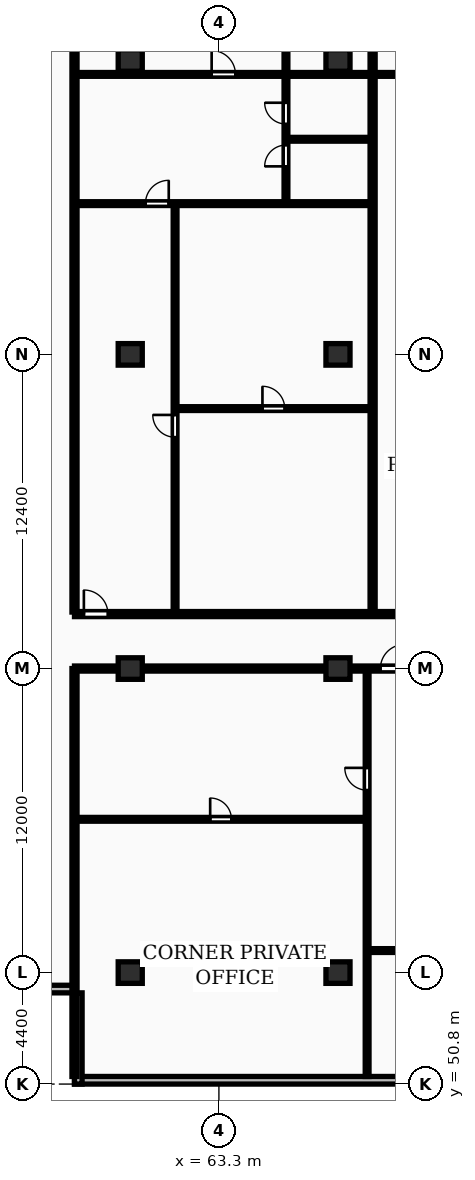
"""IFC4 building model, lengths in metres.
Left out: names, types, materials, properties, quantities, classifications, styles, units other than length and angle.
Written with IfcOpenShell. Run it as: python <this file> out.ifc"""

import sys

from ifc_helpers import new_model, si_unit, direction, frame, frame_2d, origin, origin_2d, place, context, subcontext, project, spatial, rectangle, extrude, element, fill, save


model = new_model("IFC4")
c1 = context("Model", 3, precision=1e-05, world=origin(), true_north=direction((0.0, 1.0)))
c2 = subcontext(c1, "Body", "Model", "MODEL_VIEW")
j1 = project(units=[si_unit("LENGTHUNIT", "METRE"), si_unit("PLANEANGLEUNIT", "RADIAN")], contexts=[c1])
p1 = place(None, origin())
s1 = spatial("IfcSite", under=j1, at=p1, CompositionType="ELEMENT")
p2 = place(p1, origin())
s2 = spatial("IfcBuilding", under=s1, at=p2, CompositionType="ELEMENT")
p3 = place(p2, frame((0.0, 0.0, 87.3)))
s3 = spatial("IfcBuildingStorey", under=s2, at=p3, CompositionType="ELEMENT", Elevation=87.3)
for number, where, z_axis, x_axis in (
    (1, (59.8, 55.2, 0.0), (0.0, 0.0, 1.0), (1.0, 0.0, 0.0)),
    (2, (59.8, 67.2, 0.0), (0.0, 0.0, 1.0), (1.0, 0.0, 0.0)),
    (3, (59.8, 79.6, 0.0), (0.0, 0.0, 1.0), (1.0, 0.0, 0.0)),
    (4, (59.8, 91.2, 0.0), (0.0, 0.0, 1.0), (1.0, 0.0, 0.0)),
    (5, (68.0, 55.2, 0.0), (0.0, 0.0, 1.0), (1.0, 0.0, 0.0)),
    (6, (68.0, 67.2, 0.0), (0.0, 0.0, 1.0), (1.0, 0.0, 0.0)),
    (7, (68.0, 79.6, 0.0), (0.0, 0.0, 1.0), (1.0, 0.0, 0.0)),
    (8, (68.0, 91.2, 0.0), (0.0, 0.0, 1.0), (1.0, 0.0, 0.0)),
):
    element("IfcColumn", number, at=place(p3, frame(where, z_axis=z_axis, x_axis=x_axis)), inside=s3, PredefinedType="COLUMN", context=c2, shape_type="SweptSolid", body=[
        extrude(rectangle(XDim=0.95, YDim=0.85, at=origin_2d()), origin(), (0.0, 0.0, 1.0), 3.25),
    ])
p4 = place(p3, frame((57.6, 50.95, 0.0), z_axis=(0.0, 0.0, 1.0), x_axis=(1.0, 0.0, 0.0)))
e9 = element("IfcWall", 9, at=p4, inside=s3, PredefinedType="STANDARD", context=c2, shape_type="SweptSolid", body=[
    extrude(rectangle(XDim=73.0, YDim=0.3, at=frame_2d((36.5, 0.0))), origin(), (0.0, 0.0, 1.0), 2.97),
])
p5 = place(p4, frame((15.225, 0.0, 0.85)))
e10 = element("IfcOpeningElement", 10, at=p5, cuts=e9, PredefinedType="OPENING", context=c2, shape_type="SweptSolid", body=[
    extrude(rectangle(XDim=1.8, YDim=1.8, at=frame_2d((0.9, 0.9))), frame((0.0, 0.16, 0.0), z_axis=(0.0, -1.0, 0.0), x_axis=(1.0, 0.0, 0.0)), (0.0, 0.0, 1.0), 0.32),
])
p6 = place(p4, frame((58.575, 0.0, 0.85)))
e11 = element("IfcOpeningElement", 11, at=p6, cuts=e9, PredefinedType="OPENING", context=c2, shape_type="SweptSolid", body=[
    extrude(rectangle(XDim=1.8, YDim=1.8, at=frame_2d((0.9, 0.9))), frame((0.0, 0.16, 0.0), z_axis=(0.0, -1.0, 0.0), x_axis=(1.0, 0.0, 0.0)), (0.0, 0.0, 1.0), 0.32),
])
p7 = place(p3, frame((54.0, 54.55, 0.0), z_axis=(0.0, 0.0, 1.0), x_axis=(1.0, 0.0, 0.0)))
e12 = element("IfcWall", 12, at=p7, inside=s3, PredefinedType="STANDARD", context=c2, shape_type="SweptSolid", body=[
    extrude(rectangle(XDim=3.6, YDim=0.3, at=frame_2d((1.8, 0.0))), origin(), (0.0, 0.0, 1.0), 2.97),
])
p8 = place(p3, frame((57.75, 54.4, 0.0), z_axis=(0.0, 0.0, 1.0), x_axis=(0.0, -1.0, 0.0)))
e13 = element("IfcWall", 13, at=p8, inside=s3, PredefinedType="STANDARD", context=c2, shape_type="SweptSolid", body=[
    extrude(rectangle(XDim=3.6, YDim=0.3, at=frame_2d((1.8, 0.0))), origin(), (0.0, 0.0, 1.0), 2.97),
])
p9 = place(p3, frame((57.6, 51.1, 0.0), z_axis=(0.0, 0.0, 1.0), x_axis=(0.0, 1.0, 0.0)))
e14 = element("IfcWall", 14, at=p9, inside=s3, PredefinedType="PARTITIONING", context=c2, shape_type="SweptSolid", body=[
    extrude(rectangle(XDim=16.1, YDim=0.2, at=frame_2d((8.05, 0.0))), origin(), (0.0, 0.0, 1.0), 2.97),
])
p10 = place(p3, frame((57.6, 61.25, 0.0), z_axis=(0.0, 0.0, 1.0), x_axis=(1.0, 0.0, 0.0)))
e15 = element("IfcWall", 15, at=p10, inside=s3, PredefinedType="PARTITIONING", context=c2, shape_type="SweptSolid", body=[
    extrude(rectangle(XDim=11.55, YDim=0.15, at=frame_2d((5.775, 0.0))), origin(), (0.0, 0.0, 1.0), 2.97),
])
p11 = place(p10, frame((5.355, 0.0, 0.0)))
e16 = element("IfcOpeningElement", 16, at=p11, cuts=e15, PredefinedType="OPENING", context=c2, shape_type="SweptSolid", body=[
    extrude(rectangle(XDim=0.84, YDim=2.04, at=frame_2d((0.42, 1.02))), frame((0.0, 0.085, 0.0), z_axis=(0.0, -1.0, 0.0), x_axis=(1.0, 0.0, 0.0)), (0.0, 0.0, 1.0), 0.17),
])
p12 = place(p3, frame((69.15, 51.1, 0.0), z_axis=(0.0, 0.0, 1.0), x_axis=(0.0, 1.0, 0.0)))
e17 = element("IfcWall", 17, at=p12, inside=s3, PredefinedType="PARTITIONING", context=c2, shape_type="SweptSolid", body=[
    extrude(rectangle(XDim=16.05, YDim=0.15, at=frame_2d((8.025, 0.0))), origin(), (0.0, 0.0, 1.0), 2.97),
])
p13 = place(p12, frame((11.3, 0.0, 0.0)))
e18 = element("IfcOpeningElement", 18, at=p13, cuts=e17, PredefinedType="OPENING", context=c2, shape_type="SweptSolid", body=[
    extrude(rectangle(XDim=0.88, YDim=2.06, at=frame_2d((0.44, 1.03))), frame((0.0, 0.085, 0.0), z_axis=(0.0, -1.0, 0.0), x_axis=(1.0, 0.0, 0.0)), (0.0, 0.0, 1.0), 0.17),
])
p14 = place(p3, frame((69.17, 56.07, 0.0), z_axis=(0.0, 0.0, 1.0), x_axis=(1.0, 0.0, 0.0)))
e19 = element("IfcWall", 19, at=p14, inside=s3, PredefinedType="PARTITIONING", context=c2, shape_type="SweptSolid", body=[
    extrude(rectangle(XDim=6.76, YDim=0.15, at=frame_2d((3.38, 0.0))), origin(), (0.0, 0.0, 1.0), 2.97),
])
p15 = place(p14, frame((1.362, 0.0, 0.0)))
e20 = element("IfcOpeningElement", 20, at=p15, cuts=e19, PredefinedType="OPENING", context=c2, shape_type="SweptSolid", body=[
    extrude(rectangle(XDim=0.84, YDim=2.04, at=frame_2d((0.42, 1.02))), frame((0.0, 0.085, 0.0), z_axis=(0.0, -1.0, 0.0), x_axis=(1.0, 0.0, 0.0)), (0.0, 0.0, 1.0), 0.17),
])
p16 = place(p14, frame((4.277, 0.0, 0.0)))
e21 = element("IfcOpeningElement", 21, at=p16, cuts=e19, PredefinedType="OPENING", context=c2, shape_type="SweptSolid", body=[
    extrude(rectangle(XDim=0.88, YDim=2.06, at=frame_2d((0.44, 1.03))), frame((0.0, 0.085, 0.0), z_axis=(0.0, -1.0, 0.0), x_axis=(1.0, 0.0, 0.0)), (0.0, 0.0, 1.0), 0.17),
])
p17 = place(p3, frame((57.6, 67.2, 0.0), z_axis=(0.0, 0.0, 1.0), x_axis=(1.0, 0.0, 0.0)))
e22 = element("IfcWall", 22, at=p17, inside=s3, PredefinedType="PARTITIONING", context=c2, shape_type="SweptSolid", body=[
    extrude(rectangle(XDim=18.35, YDim=0.2, at=frame_2d((9.175, 0.0))), origin(), (0.0, 0.0, 1.0), 2.433),
])
p18 = place(p17, frame((12.075, 0.0, 0.0)))
e23 = element("IfcOpeningElement", 23, at=p18, cuts=e22, PredefinedType="OPENING", context=c2, shape_type="SweptSolid", body=[
    extrude(rectangle(XDim=0.95, YDim=2.15, at=frame_2d((0.475, 1.075))), frame((0.0, 0.11, 0.0), z_axis=(0.0, -1.0, 0.0), x_axis=(1.0, 0.0, 0.0)), (0.0, 0.0, 1.0), 0.22),
])
for number, where, z_axis, x_axis in (
    (24, (57.6, 69.43, 0.0), (0.0, 0.0, 1.0), (0.0, 1.0, 0.0)),
    (25, (69.367, 69.43, 0.0), (0.0, 0.0, 1.0), (0.0, 1.0, 0.0)),
):
    element("IfcWall", number, at=place(p3, frame(where, z_axis=z_axis, x_axis=x_axis)), inside=s3, PredefinedType="PARTITIONING", context=c2, shape_type="SweptSolid", body=[
        extrude(rectangle(XDim=26.47, YDim=0.2, at=frame_2d((13.235, 0.0))), origin(), (0.0, 0.0, 1.0), 2.97),
    ])
p19 = place(p3, frame((61.63, 77.46, 0.0), z_axis=(0.0, 0.0, 1.0), x_axis=(1.0, 0.0, 0.0)))
e26 = element("IfcWall", 26, at=p19, inside=s3, PredefinedType="PARTITIONING", context=c2, shape_type="SweptSolid", body=[
    extrude(rectangle(XDim=7.657, YDim=0.15, at=frame_2d((3.828, 0.0))), origin(), (0.0, 0.0, 1.0), 2.97),
])
p20 = place(p19, frame((3.388, 0.0, 0.0)))
e27 = element("IfcOpeningElement", 27, at=p20, cuts=e26, PredefinedType="OPENING", context=c2, shape_type="SweptSolid", body=[
    extrude(rectangle(XDim=0.88, YDim=2.06, at=frame_2d((0.44, 1.03))), frame((0.0, 0.085, 0.0), z_axis=(0.0, -1.0, 0.0), x_axis=(1.0, 0.0, 0.0)), (0.0, 0.0, 1.0), 0.17),
])
p21 = place(p3, frame((61.57, 69.41, 0.0), z_axis=(0.0, 0.0, 1.0), x_axis=(0.0, 1.0, 0.0)))
e28 = element("IfcWall", 28, at=p21, inside=s3, PredefinedType="PARTITIONING", context=c2, shape_type="SweptSolid", body=[
    extrude(rectangle(XDim=16.1, YDim=0.15, at=frame_2d((8.05, 0.0))), origin(), (0.0, 0.0, 1.0), 2.97),
])
p22 = place(p21, frame((6.92, 0.0, 0.0)))
e29 = element("IfcOpeningElement", 29, at=p22, cuts=e28, PredefinedType="OPENING", context=c2, shape_type="SweptSolid", body=[
    extrude(rectangle(XDim=0.88, YDim=2.06, at=frame_2d((0.44, 1.03))), frame((0.0, 0.085, 0.0), z_axis=(0.0, -1.0, 0.0), x_axis=(1.0, 0.0, 0.0)), (0.0, 0.0, 1.0), 0.17),
])
p23 = place(p3, frame((66.007, 88.09, 0.0), z_axis=(0.0, 0.0, 1.0), x_axis=(1.0, 0.0, 0.0)))
e30 = element("IfcWall", 30, at=p23, inside=s3, PredefinedType="PARTITIONING", context=c2, shape_type="SweptSolid", body=[
    extrude(rectangle(XDim=3.28, YDim=0.15, at=frame_2d((1.64, 0.0))), origin(), (0.0, 0.0, 1.0), 2.97),
])
p24 = place(p3, frame((65.947, 85.59, 0.0), z_axis=(0.0, 0.0, 1.0), x_axis=(0.0, 1.0, 0.0)))
e31 = element("IfcWall", 31, at=p24, inside=s3, PredefinedType="PARTITIONING", context=c2, shape_type="SweptSolid", body=[
    extrude(rectangle(XDim=10.31, YDim=0.15, at=frame_2d((5.155, 0.0))), origin(), (0.0, 0.0, 1.0), 2.97),
])
p25 = place(p24, frame((1.43, 0.0, 0.0)))
e32 = element("IfcOpeningElement", 32, at=p25, cuts=e31, PredefinedType="OPENING", context=c2, shape_type="SweptSolid", body=[
    extrude(rectangle(XDim=0.84, YDim=2.04, at=frame_2d((0.42, 1.02))), frame((0.0, 0.085, 0.0), z_axis=(0.0, -1.0, 0.0), x_axis=(1.0, 0.0, 0.0)), (0.0, 0.0, 1.0), 0.17),
])
p26 = place(p24, frame((3.102, 0.0, 0.0)))
e33 = element("IfcOpeningElement", 33, at=p26, cuts=e31, PredefinedType="OPENING", context=c2, shape_type="SweptSolid", body=[
    extrude(rectangle(XDim=0.84, YDim=2.04, at=frame_2d((0.42, 1.02))), frame((0.0, 0.085, 0.0), z_axis=(0.0, -1.0, 0.0), x_axis=(1.0, 0.0, 0.0)), (0.0, 0.0, 1.0), 0.17),
])
p27 = place(p24, frame((7.29, 0.0, 0.0)))
e34 = element("IfcOpeningElement", 34, at=p27, cuts=e31, PredefinedType="OPENING", context=c2, shape_type="SweptSolid", body=[
    extrude(rectangle(XDim=0.88, YDim=2.06, at=frame_2d((0.44, 1.03))), frame((0.0, 0.085, 0.0), z_axis=(0.0, -1.0, 0.0), x_axis=(1.0, 0.0, 0.0)), (0.0, 0.0, 1.0), 0.17),
])
p28 = place(p3, frame((57.68, 85.55, 0.0), z_axis=(0.0, 0.0, 1.0), x_axis=(1.0, 0.0, 0.0)))
e35 = element("IfcWall", 35, at=p28, inside=s3, PredefinedType="PARTITIONING", context=c2, shape_type="SweptSolid", body=[
    extrude(rectangle(XDim=11.607, YDim=0.15, at=frame_2d((5.803, 0.0))), origin(), (0.0, 0.0, 1.0), 2.97),
])
p29 = place(p28, frame((2.72, 0.0, 0.0)))
e36 = element("IfcOpeningElement", 36, at=p29, cuts=e35, PredefinedType="OPENING", context=c2, shape_type="SweptSolid", body=[
    extrude(rectangle(XDim=0.92, YDim=2.08, at=frame_2d((0.46, 1.04))), frame((0.0, 0.085, 0.0), z_axis=(0.0, -1.0, 0.0), x_axis=(1.0, 0.0, 0.0)), (0.0, 0.0, 1.0), 0.17),
])
p30 = place(p3, frame((57.68, 90.65, 0.0), z_axis=(0.0, 0.0, 1.0), x_axis=(1.0, 0.0, 0.0)))
e37 = element("IfcWall", 37, at=p30, inside=s3, PredefinedType="PARTITIONING", context=c2, shape_type="SweptSolid", body=[
    extrude(rectangle(XDim=11.607, YDim=0.15, at=frame_2d((5.803, 0.0))), origin(), (0.0, 0.0, 1.0), 2.97),
])
p31 = place(p30, frame((5.333, 0.0, 0.0)))
e38 = element("IfcOpeningElement", 38, at=p31, cuts=e37, PredefinedType="OPENING", context=c2, shape_type="SweptSolid", body=[
    extrude(rectangle(XDim=0.94, YDim=2.1, at=frame_2d((0.47, 1.05))), frame((0.0, 0.085, 0.0), z_axis=(0.0, -1.0, 0.0), x_axis=(1.0, 0.0, 0.0)), (0.0, 0.0, 1.0), 0.17),
])
p32 = place(p3, frame((69.447, 90.65, 0.0), z_axis=(0.0, 0.0, 1.0), x_axis=(1.0, 0.0, 0.0)))
e39 = element("IfcWall", 39, at=p32, inside=s3, PredefinedType="PARTITIONING", context=c2, shape_type="SweptSolid", body=[
    extrude(rectangle(XDim=18.758, YDim=0.15, at=frame_2d((9.379, 0.0))), origin(), (0.0, 0.0, 1.0), 2.97),
])
p33 = place(p32, frame((3.965, 0.0, 0.0)))
e40 = element("IfcOpeningElement", 40, at=p33, cuts=e39, PredefinedType="OPENING", context=c2, shape_type="SweptSolid", body=[
    extrude(rectangle(XDim=0.94, YDim=2.1, at=frame_2d((0.47, 1.05))), frame((0.0, 0.085, 0.0), z_axis=(0.0, -1.0, 0.0), x_axis=(1.0, 0.0, 0.0)), (0.0, 0.0, 1.0), 0.17),
])
p34 = place(p32, frame((8.909, 0.0, 0.0)))
e41 = element("IfcOpeningElement", 41, at=p34, cuts=e39, PredefinedType="OPENING", context=c2, shape_type="SweptSolid", body=[
    extrude(rectangle(XDim=0.94, YDim=2.1, at=frame_2d((0.47, 1.05))), frame((0.0, 0.085, 0.0), z_axis=(0.0, -1.0, 0.0), x_axis=(1.0, 0.0, 0.0)), (0.0, 0.0, 1.0), 0.17),
])
p35 = place(p3, frame((57.6, 69.35, 0.0), z_axis=(0.0, 0.0, 1.0), x_axis=(1.0, 0.0, 0.0)))
e42 = element("IfcWall", 42, at=p35, inside=s3, PredefinedType="PARTITIONING", context=c2, shape_type="SweptSolid", body=[
    extrude(rectangle(XDim=73.0, YDim=0.2, at=frame_2d((36.5, 0.0))), origin(), (0.0, 0.0, 1.0), 2.97),
])
p36 = place(p35, frame((0.37, 0.0, 0.0)))
e43 = element("IfcOpeningElement", 43, at=p36, cuts=e42, PredefinedType="OPENING", context=c2, shape_type="SweptSolid", body=[
    extrude(rectangle(XDim=0.95, YDim=2.15, at=frame_2d((0.475, 1.075))), frame((0.0, 0.11, 0.0), z_axis=(0.0, -1.0, 0.0), x_axis=(1.0, 0.0, 0.0)), (0.0, 0.0, 1.0), 0.22),
])
p37 = place(p35, frame((20.421, 0.0, 0.0)))
e44 = element("IfcOpeningElement", 44, at=p37, cuts=e42, PredefinedType="OPENING", context=c2, shape_type="SweptSolid", body=[
    extrude(rectangle(XDim=1.22, YDim=2.18, at=frame_2d((0.61, 1.09))), frame((0.0, 0.11, 0.0), z_axis=(0.0, -1.0, 0.0), x_axis=(1.0, 0.0, 0.0)), (0.0, 0.0, 1.0), 0.22),
])
p38 = place(p35, frame((32.729, 0.0, 0.0)))
e45 = element("IfcOpeningElement", 45, at=p38, cuts=e42, PredefinedType="OPENING", context=c2, shape_type="SweptSolid", body=[
    extrude(rectangle(XDim=0.95, YDim=2.15, at=frame_2d((0.475, 1.075))), frame((0.0, 0.11, 0.0), z_axis=(0.0, -1.0, 0.0), x_axis=(1.0, 0.0, 0.0)), (0.0, 0.0, 1.0), 0.22),
])
p39 = place(p35, frame((46.157, 0.0, 0.0)))
e46 = element("IfcOpeningElement", 46, at=p39, cuts=e42, PredefinedType="OPENING", context=c2, shape_type="SweptSolid", body=[
    extrude(rectangle(XDim=0.95, YDim=2.15, at=frame_2d((0.475, 1.075))), frame((0.0, 0.11, 0.0), z_axis=(0.0, -1.0, 0.0), x_axis=(1.0, 0.0, 0.0)), (0.0, 0.0, 1.0), 0.22),
])
p40 = place(p35, frame((60.803, 0.0, 0.0)))
e47 = element("IfcOpeningElement", 47, at=p40, cuts=e42, PredefinedType="OPENING", context=c2, shape_type="SweptSolid", body=[
    extrude(rectangle(XDim=0.95, YDim=2.15, at=frame_2d((0.475, 1.075))), frame((0.0, 0.11, 0.0), z_axis=(0.0, -1.0, 0.0), x_axis=(1.0, 0.0, 0.0)), (0.0, 0.0, 1.0), 0.22),
])
p41 = place(p11, origin())
e48 = element("IfcDoor", 48, at=p41, inside=s3, OperationType="SINGLE_SWING_LEFT", PredefinedType="DOOR", context=c2, shape_type="SweptSolid", body=[
    extrude(rectangle(XDim=0.84, YDim=2.04, at=frame_2d((0.42, 1.02))), frame((0.0, 0.025, 0.0), z_axis=(0.0, -1.0, 0.0), x_axis=(1.0, 0.0, 0.0)), (0.0, 0.0, 1.0), 0.05),
])
fill(e16, e48)
p42 = place(p13, origin())
e49 = element("IfcDoor", 49, at=p42, inside=s3, OperationType="SINGLE_SWING_RIGHT", PredefinedType="DOOR", context=c2, shape_type="SweptSolid", body=[
    extrude(rectangle(XDim=0.88, YDim=2.06, at=frame_2d((0.44, 1.03))), frame((0.0, 0.025, 0.0), z_axis=(0.0, -1.0, 0.0), x_axis=(1.0, 0.0, 0.0)), (0.0, 0.0, 1.0), 0.05),
])
fill(e18, e49)
p43 = place(p18, origin())
e50 = element("IfcDoor", 50, at=p43, inside=s3, OperationType="SINGLE_SWING_RIGHT", PredefinedType="DOOR", context=c2, shape_type="SweptSolid", body=[
    extrude(rectangle(XDim=0.95, YDim=2.15, at=frame_2d((0.475, 1.075))), frame((0.0, 0.025, 0.0), z_axis=(0.0, -1.0, 0.0), x_axis=(1.0, 0.0, 0.0)), (0.0, 0.0, 1.0), 0.05),
])
fill(e23, e50)
p44 = place(p20, origin())
e51 = element("IfcDoor", 51, at=p44, inside=s3, OperationType="SINGLE_SWING_LEFT", PredefinedType="DOOR", context=c2, shape_type="SweptSolid", body=[
    extrude(rectangle(XDim=0.88, YDim=2.06, at=frame_2d((0.44, 1.03))), frame((0.0, 0.025, 0.0), z_axis=(0.0, -1.0, 0.0), x_axis=(1.0, 0.0, 0.0)), (0.0, 0.0, 1.0), 0.05),
])
fill(e27, e51)
p45 = place(p22, origin())
e52 = element("IfcDoor", 52, at=p45, inside=s3, OperationType="SINGLE_SWING_RIGHT", PredefinedType="DOOR", context=c2, shape_type="SweptSolid", body=[
    extrude(rectangle(XDim=0.88, YDim=2.06, at=frame_2d((0.44, 1.03))), frame((0.0, 0.025, 0.0), z_axis=(0.0, -1.0, 0.0), x_axis=(1.0, 0.0, 0.0)), (0.0, 0.0, 1.0), 0.05),
])
fill(e29, e52)
p46 = place(p25, origin())
e53 = element("IfcDoor", 53, at=p46, inside=s3, OperationType="SINGLE_SWING_LEFT", PredefinedType="DOOR", context=c2, shape_type="SweptSolid", body=[
    extrude(rectangle(XDim=0.84, YDim=2.04, at=frame_2d((0.42, 1.02))), frame((0.0, 0.025, 0.0), z_axis=(0.0, -1.0, 0.0), x_axis=(1.0, 0.0, 0.0)), (0.0, 0.0, 1.0), 0.05),
])
fill(e32, e53)
p47 = place(p26, origin())
e54 = element("IfcDoor", 54, at=p47, inside=s3, OperationType="SINGLE_SWING_RIGHT", PredefinedType="DOOR", context=c2, shape_type="SweptSolid", body=[
    extrude(rectangle(XDim=0.84, YDim=2.04, at=frame_2d((0.42, 1.02))), frame((0.0, 0.025, 0.0), z_axis=(0.0, -1.0, 0.0), x_axis=(1.0, 0.0, 0.0)), (0.0, 0.0, 1.0), 0.05),
])
fill(e33, e54)
p48 = place(p29, origin())
e55 = element("IfcDoor", 55, at=p48, inside=s3, OperationType="SINGLE_SWING_RIGHT", PredefinedType="DOOR", context=c2, shape_type="SweptSolid", body=[
    extrude(rectangle(XDim=0.92, YDim=2.08, at=frame_2d((0.46, 1.04))), frame((0.0, 0.025, 0.0), z_axis=(0.0, -1.0, 0.0), x_axis=(1.0, 0.0, 0.0)), (0.0, 0.0, 1.0), 0.05),
])
fill(e36, e55)
p49 = place(p31, origin())
e56 = element("IfcDoor", 56, at=p49, inside=s3, OperationType="SINGLE_SWING_LEFT", PredefinedType="DOOR", context=c2, shape_type="SweptSolid", body=[
    extrude(rectangle(XDim=0.94, YDim=2.1, at=frame_2d((0.47, 1.05))), frame((0.0, 0.025, 0.0), z_axis=(0.0, -1.0, 0.0), x_axis=(1.0, 0.0, 0.0)), (0.0, 0.0, 1.0), 0.05),
])
fill(e38, e56)
p50 = place(p36, origin())
e57 = element("IfcDoor", 57, at=p50, inside=s3, OperationType="SINGLE_SWING_LEFT", PredefinedType="DOOR", context=c2, shape_type="SweptSolid", body=[
    extrude(rectangle(XDim=0.95, YDim=2.15, at=frame_2d((0.475, 1.075))), frame((0.0, 0.025, 0.0), z_axis=(0.0, -1.0, 0.0), x_axis=(1.0, 0.0, 0.0)), (0.0, 0.0, 1.0), 0.05),
])
fill(e43, e57)
save(model, sys.argv[1])
